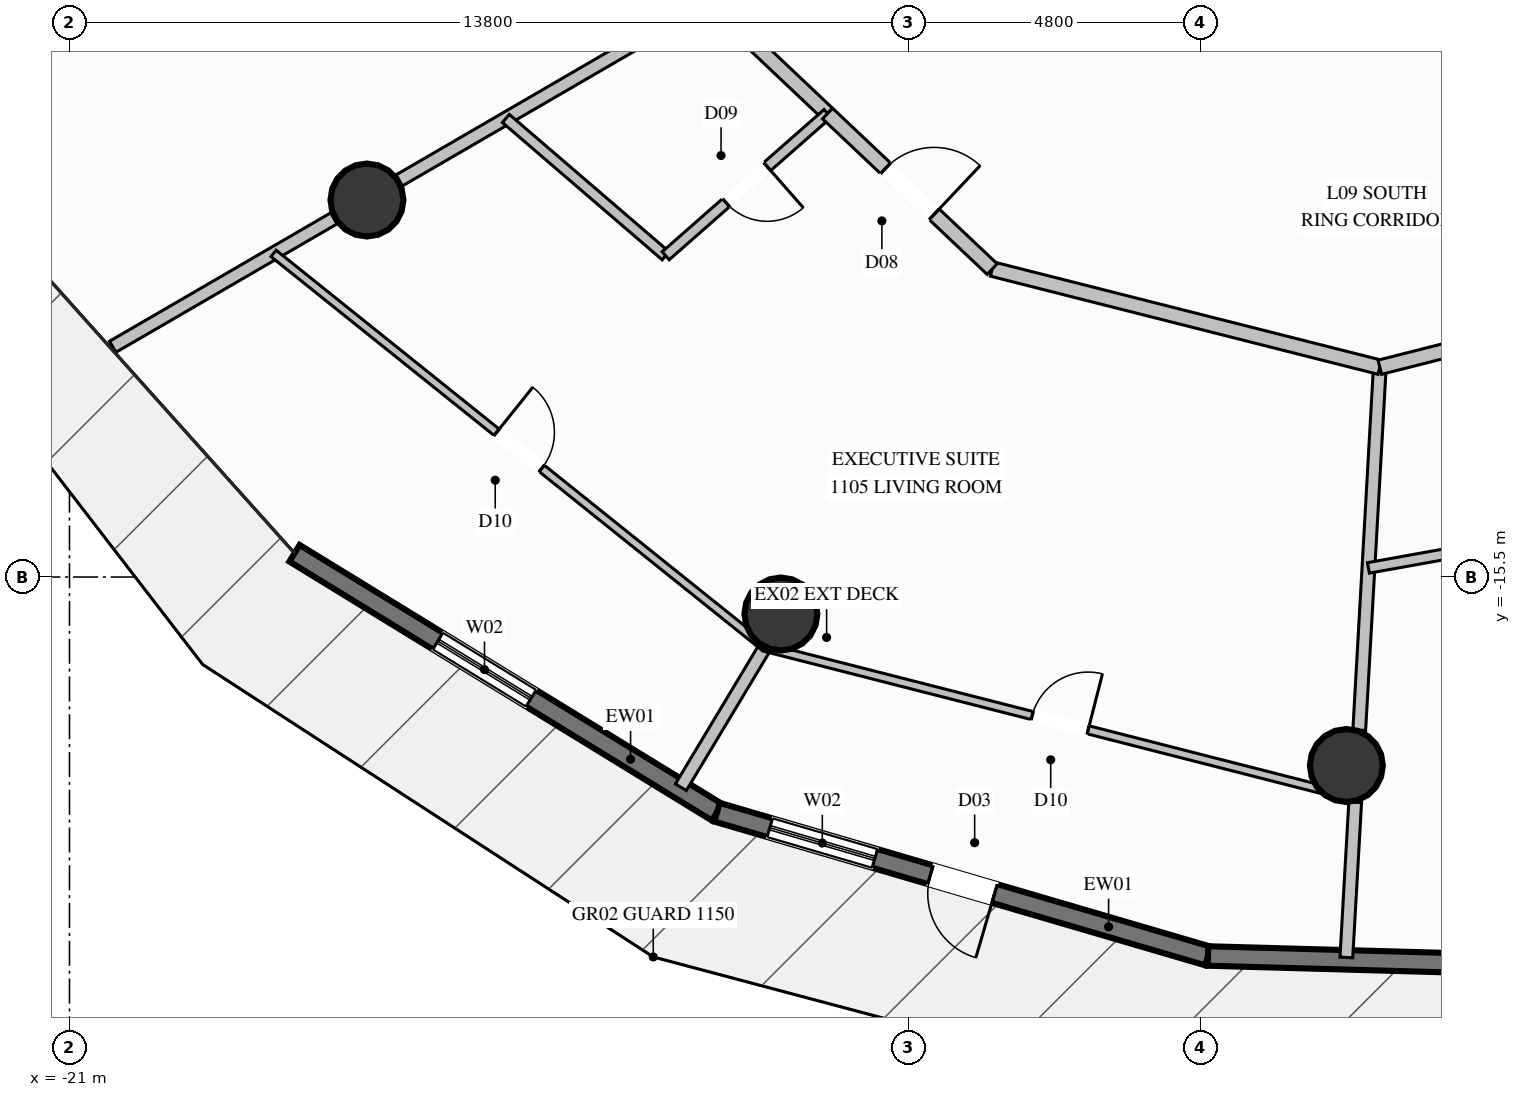
"""IFC4 building model, lengths in metres.
Left out: names, types, materials, properties, quantities, classifications, styles, units other than length and angle.
Written with IfcOpenShell. Run it as: python <this file> out.ifc"""

import sys

from ifc_helpers import new_model, si_unit, direction, frame, frame_2d, origin, origin_2d, place, context, subcontext, project, spatial, rectangle, circle, extrude, element, fill, save


model = new_model("IFC4")
c1 = context("Model", 3, precision=1e-05, world=origin(), true_north=direction((0.0, 1.0)))
c2 = subcontext(c1, "Body", "Model", "MODEL_VIEW")
j1 = project(units=[si_unit("LENGTHUNIT", "METRE"), si_unit("PLANEANGLEUNIT", "RADIAN")], contexts=[c1])
p1 = place(None, origin())
s1 = spatial("IfcSite", under=j1, at=p1, CompositionType="ELEMENT")
p2 = place(p1, origin())
s2 = spatial("IfcBuilding", under=s1, at=p2, CompositionType="ELEMENT")
p3 = place(p2, frame((0.0, 0.0, 42.8)))
s3 = spatial("IfcBuildingStorey", under=s2, at=p3, CompositionType="ELEMENT", Elevation=42.8)
for number, where, z_axis, x_axis in (
    (1, (-16.108, -9.3, 0.0), (0.0, 0.0, 1.0), (1.0, 0.0, 0.0)),
    (2, (-9.3, -16.108, 0.0), (0.0, 0.0, 1.0), (1.0, 0.0, 0.0)),
    (3, (0.0, -18.6, 0.0), (0.0, 0.0, 1.0), (1.0, 0.0, 0.0)),
):
    element("IfcColumn", number, at=place(p3, frame(where, z_axis=z_axis, x_axis=x_axis)), inside=s3, PredefinedType="COLUMN", context=c2, shape_type="SweptSolid", body=[
        extrude(circle(Radius=0.6, at=origin_2d()), origin(), (0.0, 0.0, 1.0), 3.6),
    ])
p4 = place(p3, frame((-10.35, -19.368, 0.0), z_axis=(0.0, 0.0, 1.0), x_axis=(-0.852602113439, 0.522560653091, 0.0)))
e4 = element("IfcWall", 4, at=p4, inside=s3, PredefinedType="SOLIDWALL", context=c2, shape_type="SweptSolid", body=[
    extrude(rectangle(XDim=8.15, YDim=0.32, at=frame_2d((4.075, 0.0))), origin(), (0.0, 0.0, 1.0), 3.34),
])
p5 = place(p4, frame((3.586, 0.0, 0.35)))
e5 = element("IfcOpeningElement", 5, at=p5, cuts=e4, PredefinedType="OPENING", context=c2, shape_type="SweptSolid", body=[
    extrude(rectangle(XDim=1.8, YDim=2.6, at=frame_2d((0.9, 1.3))), frame((0.0, 0.17, 0.0), z_axis=(0.0, -1.0, 0.0), x_axis=(1.0, 0.0, 0.0)), (0.0, 0.0, 1.0), 0.34),
])
p6 = place(p3, frame((-2.276, -21.732, 0.0), z_axis=(0.0, 0.0, 1.0), x_axis=(-0.959710880311, 0.280989370285, 0.0)))
e6 = element("IfcWall", 6, at=p6, inside=s3, PredefinedType="SOLIDWALL", context=c2, shape_type="SweptSolid", body=[
    extrude(rectangle(XDim=8.413, YDim=0.32, at=frame_2d((4.207, 0.0))), origin(), (0.0, 0.0, 1.0), 3.34),
])
p7 = place(p6, frame((5.709, 0.0, 0.35)))
e7 = element("IfcOpeningElement", 7, at=p7, cuts=e6, PredefinedType="OPENING", context=c2, shape_type="SweptSolid", body=[
    extrude(rectangle(XDim=1.8, YDim=2.6, at=frame_2d((0.9, 1.3))), frame((0.0, 0.17, 0.0), z_axis=(0.0, -1.0, 0.0), x_axis=(1.0, 0.0, 0.0)), (0.0, 0.0, 1.0), 0.34),
])
p8 = place(p6, frame((3.656, 0.0, 0.0)))
e8 = element("IfcOpeningElement", 8, at=p8, cuts=e6, PredefinedType="OPENING", context=c2, shape_type="SweptSolid", body=[
    extrude(rectangle(XDim=1.1, YDim=2.2, at=frame_2d((0.55, 1.1))), frame((0.0, 0.17, 0.0), z_axis=(0.0, -1.0, 0.0), x_axis=(1.0, 0.0, 0.0)), (0.0, 0.0, 1.0), 0.34),
])
p9 = place(p3, frame((6.133, -21.967, 0.0), z_axis=(0.0, 0.0, 1.0), x_axis=(-0.999609369541, 0.027948315271, 0.0)))
e9 = element("IfcWall", 9, at=p9, inside=s3, PredefinedType="SOLIDWALL", context=c2, shape_type="SweptSolid", body=[
    extrude(rectangle(XDim=8.412, YDim=0.32, at=frame_2d((4.206, 0.0))), origin(), (0.0, 0.0, 1.0), 3.34),
])
p10 = place(p9, frame((2.118, 0.0, 0.35)))
e10 = element("IfcOpeningElement", 10, at=p10, cuts=e9, PredefinedType="OPENING", context=c2, shape_type="SweptSolid", body=[
    extrude(rectangle(XDim=1.8, YDim=2.6, at=frame_2d((0.9, 1.3))), frame((0.0, 0.17, 0.0), z_axis=(0.0, -1.0, 0.0), x_axis=(1.0, 0.0, 0.0)), (0.0, 0.0, 1.0), 0.34),
])
p11 = place(p3, frame((-10.492, -6.025, 0.0), z_axis=(0.0, 0.0, 1.0), x_axis=(-0.86478894661, -0.502135517387, 0.0)))
e11 = element("IfcWall", 11, at=p11, inside=s3, PredefinedType="PARTITIONING", context=c2, shape_type="SweptSolid", body=[
    extrude(rectangle(XDim=5.881, YDim=0.21, at=frame_2d((2.94, 0.0))), origin(), (0.0, 0.0, 1.0), 2.708),
])
p12 = place(p3, frame((-16.65, -9.601, 0.0), z_axis=(0.0, 0.0, 1.0), x_axis=(-0.86479138464, -0.502131318534, 0.0)))
e12 = element("IfcWall", 12, at=p12, inside=s3, PredefinedType="PARTITIONING", context=c2, shape_type="SweptSolid", body=[
    extrude(rectangle(XDim=4.208, YDim=0.21, at=frame_2d((2.104, 0.0))), origin(), (0.0, 0.0, 1.0), 3.34),
])
p13 = place(p3, frame((0.55, -12.05, 0.0), z_axis=(0.0, 0.0, 1.0), x_axis=(-0.0565763109, -0.998398277765, 0.0)))
e13 = element("IfcWall", 13, at=p13, inside=s3, PredefinedType="PARTITIONING", context=c2, shape_type="SweptSolid", body=[
    extrude(rectangle(XDim=5.977, YDim=0.21, at=frame_2d((2.988, 0.0))), origin(), (0.0, 0.0, 1.0), 3.34),
])
p14 = place(p3, frame((0.145, -19.203, 0.0), z_axis=(0.0, 0.0, 1.0), x_axis=(-0.056707225594, -0.998390850602, 0.0)))
e14 = element("IfcWall", 14, at=p14, inside=s3, PredefinedType="PARTITIONING", context=c2, shape_type="SweptSolid", body=[
    extrude(rectangle(XDim=2.557, YDim=0.21, at=frame_2d((1.279, 0.0))), origin(), (0.0, 0.0, 1.0), 3.34),
])
p15 = place(p3, frame((-10.492, -6.025, 0.0), z_axis=(0.0, 0.0, 1.0), x_axis=(0.726651583854, -0.687006168591, 0.0)))
e15 = element("IfcWall", 15, at=p15, inside=s3, PredefinedType="PARTITIONING", context=c2, shape_type="SweptSolid", body=[
    extrude(rectangle(XDim=2.697, YDim=0.24, at=frame_2d((1.349, 0.0))), origin(), (0.0, 0.0, 1.0), 3.34),
])
p16 = place(p3, frame((-13.823, -7.959, 0.0), z_axis=(0.0, 0.0, 1.0), x_axis=(0.758465196679, -0.65171354553, 0.0)))
e16 = element("IfcWall", 16, at=p16, inside=s3, PredefinedType="PLUMBINGWALL", context=c2, shape_type="SweptSolid", body=[
    extrude(rectangle(XDim=3.465, YDim=0.175, at=frame_2d((1.732, 0.0))), origin(), (0.0, 0.0, 1.0), 3.34),
])
p17 = place(p3, frame((-8.532, -7.878, 0.0), z_axis=(0.0, 0.0, 1.0), x_axis=(-0.751329434658, -0.6599273298, 0.0)))
e17 = element("IfcWall", 17, at=p17, inside=s3, PredefinedType="PLUMBINGWALL", context=c2, shape_type="SweptSolid", body=[
    extrude(rectangle(XDim=3.544, YDim=0.175, at=frame_2d((1.772, 0.0))), origin(), (0.0, 0.0, 1.0), 3.34),
])
p18 = place(p17, frame((1.322, 0.0, 0.0)))
e18 = element("IfcOpeningElement", 18, at=p18, cuts=e17, PredefinedType="OPENING", context=c2, shape_type="SweptSolid", body=[
    extrude(rectangle(XDim=0.9, YDim=2.1, at=frame_2d((0.45, 1.05))), frame((0.0, 0.098, 0.0), z_axis=(0.0, -1.0, 0.0), x_axis=(1.0, 0.0, 0.0)), (0.0, 0.0, 1.0), 0.195),
])
p19 = place(p3, frame((-9.563, -16.656, 0.0), z_axis=(0.0, 0.0, 1.0), x_axis=(-0.514896971711, -0.857252068252, 0.0)))
e19 = element("IfcWall", 19, at=p19, inside=s3, PredefinedType="PARTITIONING", context=c2, shape_type="SweptSolid", body=[
    extrude(rectangle(XDim=2.684, YDim=0.21, at=frame_2d((1.342, 0.0))), origin(), (0.0, 0.0, 1.0), 3.34),
])
p20 = place(p3, frame((-5.825, -10.436, 0.0), z_axis=(0.0, 0.0, 1.0), x_axis=(0.969413132073, -0.245434674331, 0.0)))
e20 = element("IfcWall", 20, at=p20, inside=s3, PredefinedType="PARTITIONING", context=c2, shape_type="SweptSolid", body=[
    extrude(rectangle(XDim=6.576, YDim=0.24, at=frame_2d((3.288, 0.0))), origin(), (0.0, 0.0, 1.0), 2.918),
])
p21 = place(p3, frame((-8.532, -7.878, 0.0), z_axis=(0.0, 0.0, 1.0), x_axis=(0.726816794063, -0.686831382413, 0.0)))
e21 = element("IfcWall", 21, at=p21, inside=s3, PredefinedType="PARTITIONING", context=c2, shape_type="SweptSolid", body=[
    extrude(rectangle(XDim=3.725, YDim=0.24, at=frame_2d((1.862, 0.0))), origin(), (0.0, 0.0, 1.0), 3.34),
])
p22 = place(p21, frame((1.312, 0.0, 0.0)))
e22 = element("IfcOpeningElement", 22, at=p22, cuts=e21, PredefinedType="OPENING", context=c2, shape_type="SweptSolid", body=[
    extrude(rectangle(XDim=1.1, YDim=2.3, at=frame_2d((0.55, 1.15))), frame((0.0, 0.13, 0.0), z_axis=(0.0, -1.0, 0.0), x_axis=(1.0, 0.0, 0.0)), (0.0, 0.0, 1.0), 0.26),
])
p23 = place(p3, frame((-17.644, -10.178, 0.0), z_axis=(0.0, 0.0, 1.0), x_axis=(0.780247491349, -0.625470904394, 0.0)))
e23 = element("IfcWall", 23, at=p23, inside=s3, PredefinedType="PARTITIONING", context=c2, shape_type="SweptSolid", body=[
    extrude(rectangle(XDim=10.357, YDim=0.135, at=frame_2d((5.178, 0.0))), origin(), (0.0, 0.0, 1.0), 2.791),
])
p24 = place(p23, frame((4.703, 0.0, 0.0)))
e24 = element("IfcOpeningElement", 24, at=p24, cuts=e23, PredefinedType="OPENING", context=c2, shape_type="SweptSolid", body=[
    extrude(rectangle(XDim=0.95, YDim=2.1, at=frame_2d((0.475, 1.05))), frame((0.0, 0.078, 0.0), z_axis=(0.0, -1.0, 0.0), x_axis=(1.0, 0.0, 0.0)), (0.0, 0.0, 1.0), 0.155),
])
p25 = place(p3, frame((-9.563, -16.656, 0.0), z_axis=(0.0, 0.0, 1.0), x_axis=(0.968932863531, -0.247323888796, 0.0)))
e25 = element("IfcWall", 25, at=p25, inside=s3, PredefinedType="PARTITIONING", context=c2, shape_type="SweptSolid", body=[
    extrude(rectangle(XDim=10.023, YDim=0.135, at=frame_2d((5.012, 0.0))), origin(), (0.0, 0.0, 1.0), 2.791),
])
p26 = place(p25, frame((4.537, 0.0, 0.0)))
e26 = element("IfcOpeningElement", 26, at=p26, cuts=e25, PredefinedType="OPENING", context=c2, shape_type="SweptSolid", body=[
    extrude(rectangle(XDim=0.95, YDim=2.1, at=frame_2d((0.475, 1.05))), frame((0.0, 0.078, 0.0), z_axis=(0.0, -1.0, 0.0), x_axis=(1.0, 0.0, 0.0)), (0.0, 0.0, 1.0), 0.155),
])
p27 = place(p3, frame((0.55, -12.05, 0.0), z_axis=(0.0, 0.0, 1.0), x_axis=(0.969415576054, 0.245425020941, 0.0)))
e27 = element("IfcWall", 27, at=p27, inside=s3, PredefinedType="PARTITIONING", context=c2, shape_type="SweptSolid", body=[
    extrude(rectangle(XDim=2.762, YDim=0.24, at=frame_2d((1.381, 0.0))), origin(), (0.0, 0.0, 1.0), 2.918),
])
p28 = place(p3, frame((0.363, -15.35, 0.0), z_axis=(0.0, 0.0, 1.0), x_axis=(0.984276159759, 0.176636466593, 0.0)))
e28 = element("IfcWall", 28, at=p28, inside=s3, PredefinedType="PLUMBINGWALL", context=c2, shape_type="SweptSolid", body=[
    extrude(rectangle(XDim=3.516, YDim=0.175, at=frame_2d((1.758, 0.0))), origin(), (0.0, 0.0, 1.0), 3.34),
])
p29 = place(p5, origin())
e29 = element("IfcWindow", 29, at=p29, inside=s3, PartitioningType="SINGLE_PANEL", PredefinedType="WINDOW", context=c2, shape_type="SweptSolid", body=[
    extrude(rectangle(XDim=1.8, YDim=2.6, at=frame_2d((0.9, 1.3))), frame((0.0, 0.03, 0.0), z_axis=(0.0, -1.0, 0.0), x_axis=(1.0, 0.0, 0.0)), (0.0, 0.0, 1.0), 0.06),
])
fill(e5, e29)
p30 = place(p7, origin())
e30 = element("IfcWindow", 30, at=p30, inside=s3, PartitioningType="SINGLE_PANEL", PredefinedType="WINDOW", context=c2, shape_type="SweptSolid", body=[
    extrude(rectangle(XDim=1.8, YDim=2.6, at=frame_2d((0.9, 1.3))), frame((0.0, 0.03, 0.0), z_axis=(0.0, -1.0, 0.0), x_axis=(1.0, 0.0, 0.0)), (0.0, 0.0, 1.0), 0.06),
])
fill(e7, e30)
p31 = place(p8, origin())
e31 = element("IfcDoor", 31, at=p31, inside=s3, OperationType="SINGLE_SWING_LEFT", PredefinedType="DOOR", context=c2, shape_type="SweptSolid", body=[
    extrude(rectangle(XDim=1.1, YDim=2.2, at=frame_2d((0.55, 1.1))), frame((0.0, 0.025, 0.0), z_axis=(0.0, -1.0, 0.0), x_axis=(1.0, 0.0, 0.0)), (0.0, 0.0, 1.0), 0.05),
])
fill(e8, e31)
p32 = place(p18, origin())
e32 = element("IfcDoor", 32, at=p32, inside=s3, OperationType="SINGLE_SWING_LEFT", PredefinedType="DOOR", context=c2, shape_type="SweptSolid", body=[
    extrude(rectangle(XDim=0.9, YDim=2.1, at=frame_2d((0.45, 1.05))), frame((0.0, 0.025, 0.0), z_axis=(0.0, -1.0, 0.0), x_axis=(1.0, 0.0, 0.0)), (0.0, 0.0, 1.0), 0.05),
])
fill(e18, e32)
p33 = place(p22, origin())
e33 = element("IfcDoor", 33, at=p33, inside=s3, OperationType="SINGLE_SWING_RIGHT", PredefinedType="DOOR", context=c2, shape_type="SweptSolid", body=[
    extrude(rectangle(XDim=1.1, YDim=2.3, at=frame_2d((0.55, 1.15))), frame((0.0, 0.025, 0.0), z_axis=(0.0, -1.0, 0.0), x_axis=(1.0, 0.0, 0.0)), (0.0, 0.0, 1.0), 0.05),
])
fill(e22, e33)
p34 = place(p24, origin())
e34 = element("IfcDoor", 34, at=p34, inside=s3, OperationType="SINGLE_SWING_LEFT", PredefinedType="DOOR", context=c2, shape_type="SweptSolid", body=[
    extrude(rectangle(XDim=0.95, YDim=2.1, at=frame_2d((0.475, 1.05))), frame((0.0, 0.025, 0.0), z_axis=(0.0, -1.0, 0.0), x_axis=(1.0, 0.0, 0.0)), (0.0, 0.0, 1.0), 0.05),
])
fill(e24, e34)
p35 = place(p26, origin())
e35 = element("IfcDoor", 35, at=p35, inside=s3, OperationType="SINGLE_SWING_RIGHT", PredefinedType="DOOR", context=c2, shape_type="SweptSolid", body=[
    extrude(rectangle(XDim=0.95, YDim=2.1, at=frame_2d((0.475, 1.05))), frame((0.0, 0.025, 0.0), z_axis=(0.0, -1.0, 0.0), x_axis=(1.0, 0.0, 0.0)), (0.0, 0.0, 1.0), 0.05),
])
fill(e26, e35)
save(model, sys.argv[1])
